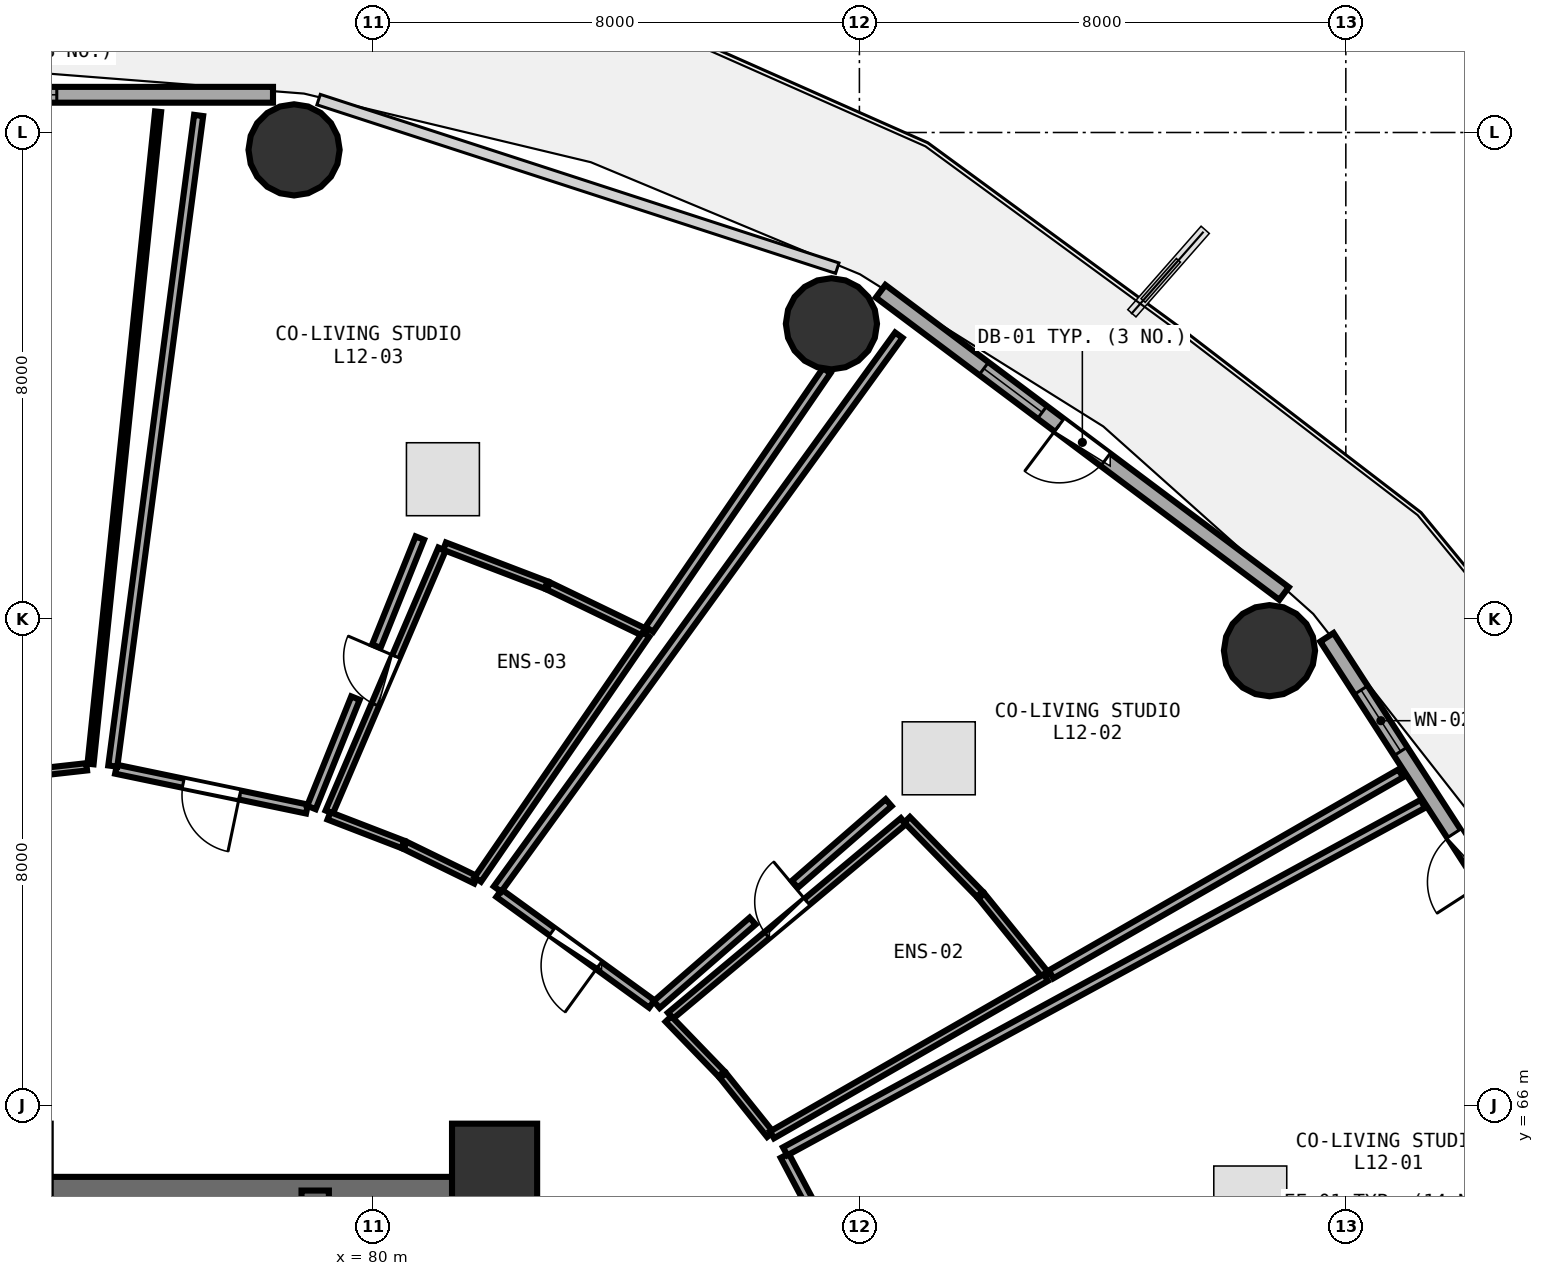
"""IFC4 building model, lengths in metres.
Left out: names, types, materials, properties, quantities, classifications, styles, units other than length and angle.
Written with IfcOpenShell. Run it as: python <this file> out.ifc"""

import sys

from ifc_helpers import new_model, si_unit, direction, frame, frame_2d, origin, origin_2d, place, context, subcontext, project, spatial, rectangle, circle, extrude, element, fill, save


model = new_model("IFC4")
c1 = context("Model", 3, precision=1e-05, world=origin(), true_north=direction((0.0, 1.0)))
c2 = subcontext(c1, "Body", "Model", "MODEL_VIEW")
j1 = project(units=[si_unit("LENGTHUNIT", "METRE"), si_unit("PLANEANGLEUNIT", "RADIAN")], contexts=[c1])
p1 = place(None, origin())
s1 = spatial("IfcSite", under=j1, at=p1, CompositionType="ELEMENT")
p2 = place(p1, origin())
s2 = spatial("IfcBuilding", under=s1, at=p2, CompositionType="ELEMENT")
p3 = place(p2, frame((0.0, 0.0, 48.75)))
s3 = spatial("IfcBuildingStorey", under=s2, at=p3, CompositionType="ELEMENT", Elevation=48.75)
p4 = place(p3, frame((82.0, 65.0, 0.0), z_axis=(0.0, 0.0, 1.0), x_axis=(1.0, 0.0, 0.0)))
e1 = element("IfcColumn", 1, at=p4, inside=s3, PredefinedType="PILASTER", context=c2, shape_type="SweptSolid", body=[
    extrude(rectangle(XDim=1.4, YDim=1.4, at=origin_2d()), origin(), (0.0, 0.0, 1.0), 3.75),
])
for number, where, z_axis, x_axis in (
    (2, (94.744, 73.478, 0.0), (0.0, 0.0, 1.0), (1.0, 0.0, 0.0)),
    (3, (87.54, 78.854, 0.0), (0.0, 0.0, 1.0), (1.0, 0.0, 0.0)),
    (4, (78.702, 81.714, 0.0), (0.0, 0.0, 1.0), (1.0, 0.0, 0.0)),
):
    element("IfcColumn", number, at=place(p3, frame(where, z_axis=z_axis, x_axis=x_axis)), inside=s3, PredefinedType="COLUMN", context=c2, shape_type="SweptSolid", body=[
        extrude(circle(Radius=0.75, at=origin_2d()), origin(), (0.0, 0.0, 1.0), 3.75),
    ])
p5 = place(p3, frame((99.999, 67.033, 0.0), z_axis=(0.0, 0.0, 1.0), x_axis=(-0.543005114258, 0.839729388488, 0.0)))
e5 = element("IfcWall", 5, at=p5, inside=s3, PredefinedType="SOLIDWALL", context=c2, shape_type="SweptSolid", body=[
    extrude(rectangle(XDim=7.938, YDim=0.26, at=frame_2d((3.969, 0.0))), origin(), (0.0, 0.0, 1.0), 3.475),
])
p6 = place(p5, frame((3.144, 0.0, 0.0)))
e6 = element("IfcOpeningElement", 6, at=p6, cuts=e5, PredefinedType="OPENING", context=c2, shape_type="SweptSolid", body=[
    extrude(rectangle(XDim=0.95, YDim=2.1, at=frame_2d((0.475, 1.05))), frame((0.0, 0.14, 0.0), z_axis=(0.0, -1.0, 0.0), x_axis=(1.0, 0.0, 0.0)), (0.0, 0.0, 1.0), 0.28),
])
p7 = place(p5, frame((5.704, 0.0, 0.85)))
e7 = element("IfcOpeningElement", 7, at=p7, cuts=e5, PredefinedType="OPENING", context=c2, shape_type="SweptSolid", body=[
    extrude(rectangle(XDim=1.2, YDim=1.45, at=frame_2d((0.6, 0.725))), frame((0.0, 0.14, 0.0), z_axis=(0.0, -1.0, 0.0), x_axis=(1.0, 0.0, 0.0)), (0.0, 0.0, 1.0), 0.28),
])
p8 = place(p3, frame((94.984, 74.418, 0.0), z_axis=(0.0, 0.0, 1.0), x_axis=(-0.80030733173, 0.599590005569, 0.0)))
e8 = element("IfcWall", 8, at=p8, inside=s3, PredefinedType="SOLIDWALL", context=c2, shape_type="SweptSolid", body=[
    extrude(rectangle(XDim=8.291, YDim=0.26, at=frame_2d((4.145, 0.0))), origin(), (0.0, 0.0, 1.0), 3.475),
])
p9 = place(p8, frame((3.67, 0.0, 0.0)))
e9 = element("IfcOpeningElement", 9, at=p9, cuts=e8, PredefinedType="OPENING", context=c2, shape_type="SweptSolid", body=[
    extrude(rectangle(XDim=0.95, YDim=2.1, at=frame_2d((0.475, 1.05))), frame((0.0, 0.14, 0.0), z_axis=(0.0, -1.0, 0.0), x_axis=(1.0, 0.0, 0.0)), (0.0, 0.0, 1.0), 0.28),
])
p10 = place(p8, frame((4.97, 0.0, 0.85)))
e10 = element("IfcOpeningElement", 10, at=p10, cuts=e8, PredefinedType="OPENING", context=c2, shape_type="SweptSolid", body=[
    extrude(rectangle(XDim=1.2, YDim=1.45, at=frame_2d((0.6, 0.725))), frame((0.0, 0.14, 0.0), z_axis=(0.0, -1.0, 0.0), x_axis=(1.0, 0.0, 0.0)), (0.0, 0.0, 1.0), 0.28),
])
p11 = place(p3, frame((78.356, 82.62, 0.0), z_axis=(0.0, 0.0, 1.0), x_axis=(-1.0, 0.0, 0.0)))
e11 = element("IfcWall", 11, at=p11, inside=s3, PredefinedType="SOLIDWALL", context=c2, shape_type="SweptSolid", body=[
    extrude(rectangle(XDim=8.712, YDim=0.26, at=frame_2d((4.356, 0.0))), origin(), (0.0, 0.0, 1.0), 3.475),
])
p12 = place(p11, frame((3.556, 0.0, 0.85)))
e12 = element("IfcOpeningElement", 12, at=p12, cuts=e11, PredefinedType="OPENING", context=c2, shape_type="SweptSolid", body=[
    extrude(rectangle(XDim=1.6, YDim=1.45, at=frame_2d((0.8, 0.725))), frame((0.0, 0.14, 0.0), z_axis=(0.0, -1.0, 0.0), x_axis=(1.0, 0.0, 0.0)), (0.0, 0.0, 1.0), 0.28),
])
p13 = place(p3, frame((74.0, 64.6, 0.0), z_axis=(0.0, 0.0, 1.0), x_axis=(1.0, 0.0, 0.0)))
e13 = element("IfcWall", 13, at=p13, inside=s3, PredefinedType="SHEAR", context=c2, shape_type="SweptSolid", body=[
    extrude(rectangle(XDim=8.0, YDim=0.45, at=frame_2d((4.0, 0.0))), origin(), (0.0, 0.0, 1.0), 3.49),
])
p14 = place(p3, frame((79.05, 58.3, 0.0), z_axis=(0.0, 0.0, 1.0), x_axis=(0.0, 1.0, 0.0)))
e14 = element("IfcWall", 14, at=p14, inside=s3, PredefinedType="SHEAR", context=c2, shape_type="SweptSolid", body=[
    extrude(rectangle(XDim=6.3, YDim=0.45, at=frame_2d((3.15, 0.0))), origin(), (0.0, 0.0, 1.0), 3.49),
])
p15 = place(p3, frame((88.162, 62.546, 0.0), z_axis=(0.0, 0.0, 1.0), x_axis=(-0.467566881753, 0.883957697567, 0.0)))
e15 = element("IfcWall", 15, at=p15, inside=s3, PredefinedType="PARTITIONING", context=c2, shape_type="SweptSolid", body=[
    extrude(rectangle(XDim=2.972, YDim=0.15, at=frame_2d((1.486, 0.0))), origin(), (0.0, 0.0, 1.0), 2.875),
])
p16 = place(p15, frame((1.011, 0.0, 0.0)))
e16 = element("IfcOpeningElement", 16, at=p16, cuts=e15, PredefinedType="OPENING", context=c2, shape_type="SweptSolid", body=[
    extrude(rectangle(XDim=0.95, YDim=2.08, at=frame_2d((0.475, 1.04))), frame((0.0, 0.085, 0.0), z_axis=(0.0, -1.0, 0.0), x_axis=(1.0, 0.0, 0.0)), (0.0, 0.0, 1.0), 0.17),
])
p17 = place(p3, frame((84.892, 67.475, 0.0), z_axis=(0.0, 0.0, 1.0), x_axis=(0.767551433238, 0.64098736129, 0.0)))
e17 = element("IfcWall", 17, at=p17, inside=s3, PredefinedType="PLUMBINGWALL", context=c2, shape_type="SweptSolid", body=[
    extrude(rectangle(XDim=4.992, YDim=0.13, at=frame_2d((2.496, 0.0))), origin(), (0.0, 0.0, 1.0), 3.175),
])
p18 = place(p17, frame((2.066, 0.0, 0.0)))
e18 = element("IfcOpeningElement", 18, at=p18, cuts=e17, PredefinedType="OPENING", context=c2, shape_type="SweptSolid", body=[
    extrude(rectangle(XDim=0.86, YDim=2.05, at=frame_2d((0.43, 1.025))), frame((0.0, 0.075, 0.0), z_axis=(0.0, -1.0, 0.0), x_axis=(1.0, 0.0, 0.0)), (0.0, 0.0, 1.0), 0.15),
])
p19 = place(p3, frame((84.586, 67.667, 0.0), z_axis=(0.0, 0.0, 1.0), x_axis=(-0.80951419377, 0.587100306664, 0.0)))
e19 = element("IfcWall", 19, at=p19, inside=s3, PredefinedType="PARTITIONING", context=c2, shape_type="SweptSolid", body=[
    extrude(rectangle(XDim=3.104, YDim=0.15, at=frame_2d((1.552, 0.0))), origin(), (0.0, 0.0, 1.0), 2.875),
])
p20 = place(p19, frame((1.077, 0.0, 0.0)))
e20 = element("IfcOpeningElement", 20, at=p20, cuts=e19, PredefinedType="OPENING", context=c2, shape_type="SweptSolid", body=[
    extrude(rectangle(XDim=0.95, YDim=2.08, at=frame_2d((0.475, 1.04))), frame((0.0, 0.085, 0.0), z_axis=(0.0, -1.0, 0.0), x_axis=(1.0, 0.0, 0.0)), (0.0, 0.0, 1.0), 0.17),
])
p21 = place(p3, frame((79.281, 70.824, 0.0), z_axis=(0.0, 0.0, 1.0), x_axis=(0.394194788946, 0.919026913843, 0.0)))
e21 = element("IfcWall", 21, at=p21, inside=s3, PredefinedType="PLUMBINGWALL", context=c2, shape_type="SweptSolid", body=[
    extrude(rectangle(XDim=4.706, YDim=0.13, at=frame_2d((2.353, 0.0))), origin(), (0.0, 0.0, 1.0), 2.875),
])
p22 = place(p21, frame((1.923, 0.0, 0.0)))
e22 = element("IfcOpeningElement", 22, at=p22, cuts=e21, PredefinedType="OPENING", context=c2, shape_type="SweptSolid", body=[
    extrude(rectangle(XDim=0.86, YDim=2.05, at=frame_2d((0.43, 1.025))), frame((0.0, 0.075, 0.0), z_axis=(0.0, -1.0, 0.0), x_axis=(1.0, 0.0, 0.0)), (0.0, 0.0, 1.0), 0.15),
])
p23 = place(p3, frame((78.914, 70.874, 0.0), z_axis=(0.0, 0.0, 1.0), x_axis=(-0.978952544969, 0.204088007237, 0.0)))
e23 = element("IfcWall", 23, at=p23, inside=s3, PredefinedType="PARTITIONING", context=c2, shape_type="SweptSolid", body=[
    extrude(rectangle(XDim=3.207, YDim=0.15, at=frame_2d((1.604, 0.0))), origin(), (0.0, 0.0, 1.0), 3.235),
])
p24 = place(p23, frame((1.129, 0.0, 0.0)))
e24 = element("IfcOpeningElement", 24, at=p24, cuts=e23, PredefinedType="OPENING", context=c2, shape_type="SweptSolid", body=[
    extrude(rectangle(XDim=0.95, YDim=2.08, at=frame_2d((0.475, 1.04))), frame((0.0, 0.085, 0.0), z_axis=(0.0, -1.0, 0.0), x_axis=(1.0, 0.0, 0.0)), (0.0, 0.0, 1.0), 0.17),
])
p25 = place(p3, frame((75.292, 71.568, 0.0), z_axis=(0.0, 0.0, 1.0), x_axis=(-0.993850084324, -0.110733959964, 0.0)))
e25 = element("IfcWall", 25, at=p25, inside=s3, PredefinedType="PARTITIONING", context=c2, shape_type="SweptSolid", body=[
    extrude(rectangle(XDim=6.202, YDim=0.12, at=frame_2d((3.101, 0.0))), origin(), (0.0, 0.0, 1.0), 2.875),
])
p26 = place(p25, frame((2.651, 0.0, 0.0)))
e26 = element("IfcOpeningElement", 26, at=p26, cuts=e25, PredefinedType="OPENING", context=c2, shape_type="SweptSolid", body=[
    extrude(rectangle(XDim=0.9, YDim=2.08, at=frame_2d((0.45, 1.04))), frame((0.0, 0.07, 0.0), z_axis=(0.0, -1.0, 0.0), x_axis=(1.0, 0.0, 0.0)), (0.0, 0.0, 1.0), 0.14),
])
p27 = place(p3, frame((86.779, 65.245, 0.0), z_axis=(0.0, 0.0, 1.0), x_axis=(0.878114235828, 0.478451030761, 0.0)))
e27 = element("IfcWall", 27, at=p27, inside=s3, PredefinedType="PARTITIONING", context=c2, shape_type="SweptSolid", body=[
    extrude(rectangle(XDim=11.942, YDim=0.15, at=frame_2d((5.971, 0.0))), origin(), (0.0, 0.0, 1.0), 2.875),
])
p28 = place(p3, frame((86.533, 65.521, 0.0), z_axis=(0.0, 0.0, 1.0), x_axis=(-0.625509784914, 0.780216321912, 0.0)))
e28 = element("IfcWall", 28, at=p28, inside=s3, PredefinedType="PLUMBINGWALL", context=c2, shape_type="SweptSolid", body=[
    extrude(rectangle(XDim=1.242, YDim=0.13, at=frame_2d((0.621, 0.0))), origin(), (0.0, 0.0, 1.0), 2.875),
])
p29 = place(p3, frame((85.73, 66.521, 0.0), z_axis=(0.0, 0.0, 1.0), x_axis=(-0.694622338853, 0.719374593913, 0.0)))
e29 = element("IfcWall", 29, at=p29, inside=s3, PredefinedType="PLUMBINGWALL", context=c2, shape_type="SweptSolid", body=[
    extrude(rectangle(XDim=1.253, YDim=0.13, at=frame_2d((0.626, 0.0))), origin(), (0.0, 0.0, 1.0), 2.875),
])
p30 = place(p3, frame((88.784, 70.699, 0.0), z_axis=(0.0, 0.0, 1.0), x_axis=(0.698493231478, -0.715616661055, 0.0)))
e30 = element("IfcWall", 30, at=p30, inside=s3, PredefinedType="PLUMBINGWALL", context=c2, shape_type="SweptSolid", body=[
    extrude(rectangle(XDim=1.711, YDim=0.13, at=frame_2d((0.855, 0.0))), origin(), (0.0, 0.0, 1.0), 2.875),
])
p31 = place(p3, frame((90.006, 69.445, 0.0), z_axis=(0.0, 0.0, 1.0), x_axis=(0.629707963092, -0.776831951723, 0.0)))
e31 = element("IfcWall", 31, at=p31, inside=s3, PredefinedType="PLUMBINGWALL", context=c2, shape_type="SweptSolid", body=[
    extrude(rectangle(XDim=1.694, YDim=0.13, at=frame_2d((0.847, 0.0))), origin(), (0.0, 0.0, 1.0), 3.175),
])
p32 = place(p3, frame((91.068, 68.103, 0.0), z_axis=(0.0, 0.0, 1.0), x_axis=(-0.867165143158, -0.498020696851, 0.0)))
e32 = element("IfcWall", 32, at=p32, inside=s3, PredefinedType="PLUMBINGWALL", context=c2, shape_type="SweptSolid", body=[
    extrude(rectangle(XDim=5.194, YDim=0.13, at=frame_2d((2.597, 0.0))), origin(), (0.0, 0.0, 1.0), 2.875),
])
p33 = place(p3, frame((82.049, 69.557, 0.0), z_axis=(0.0, 0.0, 1.0), x_axis=(0.586718941426, 0.809790641939, 0.0)))
e33 = element("IfcWall", 33, at=p33, inside=s3, PredefinedType="PARTITIONING", context=c2, shape_type="SweptSolid", body=[
    extrude(rectangle(XDim=11.249, YDim=0.15, at=frame_2d((5.625, 0.0))), origin(), (0.0, 0.0, 1.0), 2.875),
])
p34 = place(p3, frame((96.903, 71.461, 0.0), z_axis=(0.0, 0.0, 1.0), x_axis=(-0.866924194656, -0.498440007142, 0.0)))
e34 = element("IfcWall", 34, at=p34, inside=s3, PredefinedType="PARTITIONING", context=c2, shape_type="SweptSolid", body=[
    extrude(rectangle(XDim=6.634, YDim=0.15, at=frame_2d((3.317, 0.0))), origin(), (0.0, 0.0, 1.0), 2.875),
])
p35 = place(p3, frame((88.481, 70.979, 0.0), z_axis=(0.0, 0.0, 1.0), x_axis=(-0.754356172394, -0.656465357176, 0.0)))
e35 = element("IfcWall", 35, at=p35, inside=s3, PredefinedType="PARTITIONING", context=c2, shape_type="SweptSolid", body=[
    extrude(rectangle(XDim=2.045, YDim=0.15, at=frame_2d((1.022, 0.0))), origin(), (0.0, 0.0, 1.0), 3.175),
])
p36 = place(p3, frame((86.244, 69.032, 0.0), z_axis=(0.0, 0.0, 1.0), x_axis=(-0.754351792987, -0.656470389597, 0.0)))
e36 = element("IfcWall", 36, at=p36, inside=s3, PredefinedType="PARTITIONING", context=c2, shape_type="SweptSolid", body=[
    extrude(rectangle(XDim=2.093, YDim=0.15, at=frame_2d((1.046, 0.0))), origin(), (0.0, 0.0, 1.0), 3.235),
])
p37 = place(p3, frame((81.694, 69.708, 0.0), z_axis=(0.0, 0.0, 1.0), x_axis=(-0.898753964496, 0.43845331713, 0.0)))
e37 = element("IfcWall", 37, at=p37, inside=s3, PredefinedType="PLUMBINGWALL", context=c2, shape_type="SweptSolid", body=[
    extrude(rectangle(XDim=1.296, YDim=0.13, at=frame_2d((0.648, 0.0))), origin(), (0.0, 0.0, 1.0), 2.875),
])
p38 = place(p3, frame((80.492, 70.292, 0.0), z_axis=(0.0, 0.0, 1.0), x_axis=(-0.932939679843, 0.360032712089, 0.0)))
e38 = element("IfcWall", 38, at=p38, inside=s3, PredefinedType="PLUMBINGWALL", context=c2, shape_type="SweptSolid", body=[
    extrude(rectangle(XDim=1.304, YDim=0.13, at=frame_2d((0.652, 0.0))), origin(), (0.0, 0.0, 1.0), 3.48),
])
p39 = place(p3, frame((81.178, 75.197, 0.0), z_axis=(0.0, 0.0, 1.0), x_axis=(0.934026387995, -0.357204012477, 0.0)))
e39 = element("IfcWall", 39, at=p39, inside=s3, PredefinedType="PLUMBINGWALL", context=c2, shape_type="SweptSolid", body=[
    extrude(rectangle(XDim=1.789, YDim=0.13, at=frame_2d((0.894, 0.0))), origin(), (0.0, 0.0, 1.0), 3.48),
])
p40 = place(p3, frame((82.885, 74.542, 0.0), z_axis=(0.0, 0.0, 1.0), x_axis=(0.900637023717, -0.434572147648, 0.0)))
e40 = element("IfcWall", 40, at=p40, inside=s3, PredefinedType="PLUMBINGWALL", context=c2, shape_type="SweptSolid", body=[
    extrude(rectangle(XDim=1.775, YDim=0.13, at=frame_2d((0.888, 0.0))), origin(), (0.0, 0.0, 1.0), 3.48),
])
p41 = place(p3, frame((84.491, 73.746, 0.0), z_axis=(0.0, 0.0, 1.0), x_axis=(-0.566068810651, -0.824357993597, 0.0)))
e41 = element("IfcWall", 41, at=p41, inside=s3, PredefinedType="PLUMBINGWALL", context=c2, shape_type="SweptSolid", body=[
    extrude(rectangle(XDim=4.889, YDim=0.13, at=frame_2d((2.444, 0.0))), origin(), (0.0, 0.0, 1.0), 3.175),
])
p42 = place(p3, frame((75.721, 71.581, 0.0), z_axis=(0.0, 0.0, 1.0), x_axis=(0.130800348515, 0.991408729449, 0.0)))
e42 = element("IfcWall", 42, at=p42, inside=s3, PredefinedType="PARTITIONING", context=c2, shape_type="SweptSolid", body=[
    extrude(rectangle(XDim=10.792, YDim=0.15, at=frame_2d((5.396, 0.0))), origin(), (0.0, 0.0, 1.0), 2.875),
])
p43 = place(p3, frame((87.463, 78.083, 0.0), z_axis=(0.0, 0.0, 1.0), x_axis=(-0.565642433627, -0.824650615279, 0.0)))
e43 = element("IfcWall", 43, at=p43, inside=s3, PredefinedType="PARTITIONING", context=c2, shape_type="SweptSolid", body=[
    extrude(rectangle(XDim=5.157, YDim=0.15, at=frame_2d((2.579, 0.0))), origin(), (0.0, 0.0, 1.0), 2.875),
])
p44 = place(p3, frame((80.771, 75.33, 0.0), z_axis=(0.0, 0.0, 1.0), x_axis=(-0.373257508911, -0.927727779061, 0.0)))
e44 = element("IfcWall", 44, at=p44, inside=s3, PredefinedType="PARTITIONING", context=c2, shape_type="SweptSolid", body=[
    extrude(rectangle(XDim=1.916, YDim=0.15, at=frame_2d((0.958, 0.0))), origin(), (0.0, 0.0, 1.0), 2.875),
])
p45 = place(p3, frame((79.712, 72.699, 0.0), z_axis=(0.0, 0.0, 1.0), x_axis=(-0.373407797427, -0.927667298562, 0.0)))
e45 = element("IfcWall", 45, at=p45, inside=s3, PredefinedType="PARTITIONING", context=c2, shape_type="SweptSolid", body=[
    extrude(rectangle(XDim=1.94, YDim=0.15, at=frame_2d((0.97, 0.0))), origin(), (0.0, 0.0, 1.0), 3.235),
])
p46 = place(p3, frame((76.466, 82.341, 0.0), z_axis=(0.0, 0.0, 1.0), x_axis=(-0.103008831227, -0.994680441493, 0.0)))
e46 = element("IfcWall", 46, at=p46, inside=s3, PredefinedType="PARTITIONING", context=c2, shape_type="SweptSolid", body=[
    extrude(rectangle(XDim=10.784, YDim=0.1, at=frame_2d((5.392, 0.0))), origin(), (0.0, 0.0, 1.0), 2.875),
])
p47 = place(p6, frame((0.95, 0.0, 0.0), z_axis=(0.0, 0.0, 1.0), x_axis=(-1.0, 0.0, 0.0)))
e47 = element("IfcDoor", 47, at=p47, inside=s3, OperationType="SINGLE_SWING_RIGHT", PredefinedType="DOOR", context=c2, shape_type="SweptSolid", body=[
    extrude(rectangle(XDim=0.95, YDim=2.1, at=frame_2d((0.475, 1.05))), frame((0.0, 0.025, 0.0), z_axis=(0.0, -1.0, 0.0), x_axis=(1.0, 0.0, 0.0)), (0.0, 0.0, 1.0), 0.05),
])
fill(e6, e47)
p48 = place(p7, origin())
e48 = element("IfcWindow", 48, at=p48, inside=s3, PartitioningType="SINGLE_PANEL", PredefinedType="WINDOW", context=c2, shape_type="SweptSolid", body=[
    extrude(rectangle(XDim=1.2, YDim=1.45, at=frame_2d((0.6, 0.725))), frame((0.0, 0.03, 0.0), z_axis=(0.0, -1.0, 0.0), x_axis=(1.0, 0.0, 0.0)), (0.0, 0.0, 1.0), 0.06),
])
fill(e7, e48)
p49 = place(p9, frame((0.95, 0.0, 0.0), z_axis=(0.0, 0.0, 1.0), x_axis=(-1.0, 0.0, 0.0)))
e49 = element("IfcDoor", 49, at=p49, inside=s3, OperationType="SINGLE_SWING_LEFT", PredefinedType="DOOR", context=c2, shape_type="SweptSolid", body=[
    extrude(rectangle(XDim=0.95, YDim=2.1, at=frame_2d((0.475, 1.05))), frame((0.0, 0.025, 0.0), z_axis=(0.0, -1.0, 0.0), x_axis=(1.0, 0.0, 0.0)), (0.0, 0.0, 1.0), 0.05),
])
fill(e9, e49)
p50 = place(p10, origin())
e50 = element("IfcWindow", 50, at=p50, inside=s3, PartitioningType="SINGLE_PANEL", PredefinedType="WINDOW", context=c2, shape_type="SweptSolid", body=[
    extrude(rectangle(XDim=1.2, YDim=1.45, at=frame_2d((0.6, 0.725))), frame((0.0, 0.03, 0.0), z_axis=(0.0, -1.0, 0.0), x_axis=(1.0, 0.0, 0.0)), (0.0, 0.0, 1.0), 0.06),
])
fill(e10, e50)
p51 = place(p12, origin())
e51 = element("IfcWindow", 51, at=p51, inside=s3, PartitioningType="SINGLE_PANEL", PredefinedType="WINDOW", context=c2, shape_type="SweptSolid", body=[
    extrude(rectangle(XDim=1.6, YDim=1.45, at=frame_2d((0.8, 0.725))), frame((0.0, 0.03, 0.0), z_axis=(0.0, -1.0, 0.0), x_axis=(1.0, 0.0, 0.0)), (0.0, 0.0, 1.0), 0.06),
])
fill(e12, e51)
p52 = place(p18, origin())
e52 = element("IfcDoor", 52, at=p52, inside=s3, OperationType="SINGLE_SWING_RIGHT", PredefinedType="DOOR", context=c2, shape_type="SweptSolid", body=[
    extrude(rectangle(XDim=0.86, YDim=2.05, at=frame_2d((0.43, 1.025))), frame((0.0, 0.025, 0.0), z_axis=(0.0, -1.0, 0.0), x_axis=(1.0, 0.0, 0.0)), (0.0, 0.0, 1.0), 0.05),
])
fill(e18, e52)
p53 = place(p20, origin())
e53 = element("IfcDoor", 53, at=p53, inside=s3, OperationType="SINGLE_SWING_LEFT", PredefinedType="DOOR", context=c2, shape_type="SweptSolid", body=[
    extrude(rectangle(XDim=0.95, YDim=2.08, at=frame_2d((0.475, 1.04))), frame((0.0, 0.025, 0.0), z_axis=(0.0, -1.0, 0.0), x_axis=(1.0, 0.0, 0.0)), (0.0, 0.0, 1.0), 0.05),
])
fill(e20, e53)
p54 = place(p22, origin())
e54 = element("IfcDoor", 54, at=p54, inside=s3, OperationType="SINGLE_SWING_RIGHT", PredefinedType="DOOR", context=c2, shape_type="SweptSolid", body=[
    extrude(rectangle(XDim=0.86, YDim=2.05, at=frame_2d((0.43, 1.025))), frame((0.0, 0.025, 0.0), z_axis=(0.0, -1.0, 0.0), x_axis=(1.0, 0.0, 0.0)), (0.0, 0.0, 1.0), 0.05),
])
fill(e22, e54)
p55 = place(p24, origin())
e55 = element("IfcDoor", 55, at=p55, inside=s3, OperationType="SINGLE_SWING_LEFT", PredefinedType="DOOR", context=c2, shape_type="SweptSolid", body=[
    extrude(rectangle(XDim=0.95, YDim=2.08, at=frame_2d((0.475, 1.04))), frame((0.0, 0.025, 0.0), z_axis=(0.0, -1.0, 0.0), x_axis=(1.0, 0.0, 0.0)), (0.0, 0.0, 1.0), 0.05),
])
fill(e24, e55)
save(model, sys.argv[1])
